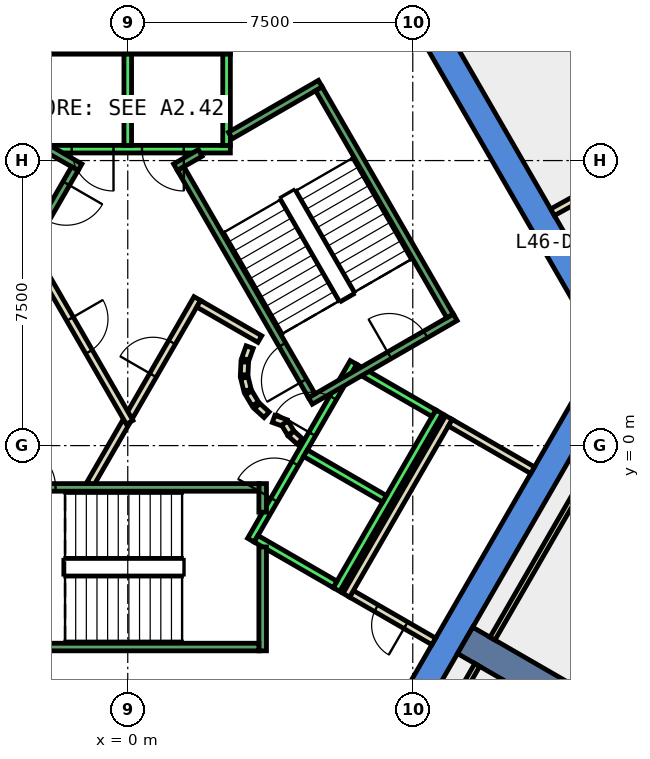
"""IFC4 building model, lengths in metres.
Left out: names, types, materials, properties, quantities, classifications, styles, units other than length and angle.
Written with IfcOpenShell. Run it as: python <this file> out.ifc"""

import sys

from ifc_helpers import new_model, si_unit, direction, frame, frame_2d, origin, place, context, subcontext, project, spatial, polyline, rectangle, outline, extrude, element, fill, save


model = new_model("IFC4")
c1 = context("Model", 3, precision=1e-05, world=origin(), true_north=direction((0.0, 1.0)))
c2 = subcontext(c1, "Body", "Model", "MODEL_VIEW")
j1 = project(units=[si_unit("LENGTHUNIT", "METRE"), si_unit("PLANEANGLEUNIT", "RADIAN")], contexts=[c1])
p1 = place(None, origin())
s1 = spatial("IfcSite", under=j1, at=p1, CompositionType="ELEMENT")
p2 = place(p1, origin())
s2 = spatial("IfcBuilding", under=s1, at=p2, CompositionType="ELEMENT")
p3 = place(p2, frame((0.0, 0.0, 206.6)))
s3 = spatial("IfcBuildingStorey", under=s2, at=p3, CompositionType="ELEMENT", Elevation=206.6)
p4 = place(p3, frame((0.0, 0.0, -0.4)))
e1 = element("IfcWall", 1, at=p4, inside=s3, PredefinedType="SHEAR", context=c2, shape_type="SweptSolid", body=[
    extrude(outline(polyline([(8.084, 11.498), (7.478, 11.148), (12.471, 2.5), (13.279, 2.5), (8.084, 11.498)])), origin(), (0.0, 0.0, 1.0), 4.2),
])
p5 = place(p3, frame((0.0, 0.0, -0.4)))
e2 = element("IfcWall", 2, at=p5, inside=s3, PredefinedType="SHEAR", context=c2, shape_type="SweptSolid", body=[
    extrude(outline(polyline([(6.64, -9.0), (13.279, 2.5), (12.471, 2.5), (6.235, -8.3), (6.64, -9.0)])), origin(), (0.0, 0.0, 1.0), 4.2),
])
p6 = place(p3, frame((8.877, -5.125, -0.4), z_axis=(0.0, 0.0, 1.0), x_axis=(0.866017533419, -0.500013631625, 0.0)))
e3 = element("IfcWall", 3, at=p6, inside=s3, PredefinedType="SHEAR", context=c2, shape_type="SweptSolid", body=[
    extrude(rectangle(XDim=9.0, YDim=0.8, at=frame_2d((4.5, 0.0))), origin(), (0.0, 0.0, 1.0), 4.2),
])
p7 = place(p3, frame((12.474, 6.856, 0.0), z_axis=(0.0, 0.0, 1.0), x_axis=(-0.875305814696, -0.483569778584, 0.0)))
e4 = element("IfcWall", 4, at=p7, inside=s3, PredefinedType="PARTITIONING", context=c2, shape_type="SweptSolid", body=[
    extrude(rectangle(XDim=1.481, YDim=0.2, at=frame_2d((0.74, 0.0))), origin(), (0.0, 0.0, 1.0), 3.8),
])
p8 = place(p3, frame((8.053, -5.152, 0.0), z_axis=(0.0, 0.0, 1.0), x_axis=(-0.866022959057, 0.500004234368, 0.0)))
e5 = element("IfcWall", 5, at=p8, inside=s3, PredefinedType="PARTITIONING", context=c2, shape_type="SweptSolid", body=[
    extrude(rectangle(XDim=2.5, YDim=0.2, at=frame_2d((1.25, 0.0))), origin(), (0.0, 0.0, 1.0), 3.8),
])
p9 = place(p8, frame((0.85, 0.0, 0.0)))
e6 = element("IfcOpeningElement", 6, at=p9, cuts=e5, PredefinedType="OPENING", context=c2, shape_type="SweptSolid", body=[
    extrude(rectangle(XDim=0.9, YDim=2.1, at=frame_2d((0.45, 1.05))), frame((0.0, 0.11, 0.0), z_axis=(0.0, -1.0, 0.0), x_axis=(1.0, 0.0, 0.0)), (0.0, 0.0, 1.0), 0.22),
])
p10 = place(p3, frame((5.751, -3.938, 0.0), z_axis=(0.0, 0.0, 1.0), x_axis=(0.500034260056, 0.866005622828, 0.0)))
e7 = element("IfcWall", 7, at=p10, inside=s3, PredefinedType="PARTITIONING", context=c2, shape_type="SweptSolid", body=[
    extrude(rectangle(XDim=5.399, YDim=0.2, at=frame_2d((2.7, 0.0))), origin(), (0.0, 0.0, 1.0), 3.8),
])
p11 = place(p3, frame((8.488, 0.602, 0.0), z_axis=(0.0, 0.0, 1.0), x_axis=(0.866022959057, -0.500004234368, 0.0)))
e8 = element("IfcWall", 8, at=p11, inside=s3, PredefinedType="PARTITIONING", context=c2, shape_type="SweptSolid", body=[
    extrude(rectangle(XDim=2.5, YDim=0.2, at=frame_2d((1.25, 0.0))), origin(), (0.0, 0.0, 1.0), 3.8),
])
p12 = place(p3, frame((7.283, -9.086, 0.0), z_axis=(0.0, 0.0, 1.0), x_axis=(0.500035303972, 0.866005020067, 0.0)))
e9 = element("IfcWall", 9, at=p12, inside=s3, PredefinedType="PARTITIONING", context=c2, shape_type="SweptSolid", body=[
    extrude(rectangle(XDim=3.828, YDim=0.15, at=frame_2d((1.914, 0.0))), origin(), (0.0, 0.0, 1.0), 3.8),
])
p13 = place(p3, frame((-0.982, -1.0, 0.0), z_axis=(0.0, 0.0, 1.0), x_axis=(0.50024047865, 0.865886518847, 0.0)))
e10 = element("IfcWall", 10, at=p13, inside=s3, PredefinedType="PARTITIONING", context=c2, shape_type="SweptSolid", body=[
    extrude(rectangle(XDim=1.863, YDim=0.2, at=frame_2d((0.931, 0.0))), origin(), (0.0, 0.0, 1.0), 3.8),
])
p14 = place(p3, frame((0.05, 0.787, 0.0), z_axis=(0.0, 0.0, 1.0), x_axis=(0.499954076797, 0.866051915934, 0.0)))
e11 = element("IfcWall", 11, at=p14, inside=s3, PredefinedType="PARTITIONING", context=c2, shape_type="SweptSolid", body=[
    extrude(rectangle(XDim=3.558, YDim=0.2, at=frame_2d((1.779, 0.0))), origin(), (0.0, 0.0, 1.0), 3.8),
])
p15 = place(p14, frame((1.229, 0.0, 0.0)))
e12 = element("IfcOpeningElement", 12, at=p15, cuts=e11, PredefinedType="OPENING", context=c2, shape_type="SweptSolid", body=[
    extrude(rectangle(XDim=1.0, YDim=2.1, at=frame_2d((0.5, 1.05))), frame((0.0, 0.11, 0.0), z_axis=(0.0, -1.0, 0.0), x_axis=(1.0, 0.0, 0.0)), (0.0, 0.0, 1.0), 0.22),
])
p16 = place(p3, frame((1.866, 3.732, 0.0), z_axis=(0.0, 0.0, 1.0), x_axis=(0.866043361281, -0.499968895414, 0.0)))
e13 = element("IfcWall", 13, at=p16, inside=s3, PredefinedType="PARTITIONING", context=c2, shape_type="SweptSolid", body=[
    extrude(rectangle(XDim=1.858, YDim=0.2, at=frame_2d((0.929, 0.0))), origin(), (0.0, 0.0, 1.0), 3.8),
])
p17 = place(p3, frame((3.208, 2.592, 0.0), z_axis=(0.0, 0.0, 1.0), x_axis=(-0.337388820924, -0.941365382578, 0.0)))
e14 = element("IfcWall", 14, at=p17, inside=s3, PredefinedType="PARTITIONING", context=c2, shape_type="SweptSolid", body=[
    extrude(rectangle(XDim=0.338, YDim=0.2, at=frame_2d((0.169, 0.0))), origin(), (0.0, 0.0, 1.0), 3.8),
])
p18 = place(p3, frame((3.079, 2.199, 0.0), z_axis=(0.0, 0.0, 1.0), x_axis=(-0.047771483479, -0.998858290933, 0.0)))
e15 = element("IfcWall", 15, at=p18, inside=s3, PredefinedType="PARTITIONING", context=c2, shape_type="SweptSolid", body=[
    extrude(rectangle(XDim=0.337, YDim=0.2, at=frame_2d((0.169, 0.0))), origin(), (0.0, 0.0, 1.0), 3.8),
])
p19 = place(p3, frame((3.07, 1.786, 0.0), z_axis=(0.0, 0.0, 1.0), x_axis=(0.242705583207, -0.970099994784, 0.0)))
e16 = element("IfcWall", 16, at=p19, inside=s3, PredefinedType="PARTITIONING", context=c2, shape_type="SweptSolid", body=[
    extrude(rectangle(XDim=0.338, YDim=0.2, at=frame_2d((0.169, 0.0))), origin(), (0.0, 0.0, 1.0), 3.8),
])
for number, where, z_axis, x_axis in (
    (17, (3.182, 1.388, 0.0), (0.0, 0.0, 1.0), (0.512, -0.859, 0.0)),
    (18, (3.404, 1.039, 0.0), (0.0, 0.0, 1.0), (0.74, -0.672, 0.0)),
):
    element("IfcWall", number, at=place(p3, frame(where, z_axis=z_axis, x_axis=x_axis)), inside=s3, PredefinedType="PARTITIONING", context=c2, shape_type="SweptSolid", body=[
        extrude(rectangle(XDim=0.338, YDim=0.2, at=frame_2d((0.169, 0.0))), origin(), (0.0, 0.0, 1.0), 3.8),
    ])
p20 = place(p3, frame((3.838, 0.702, 0.0), z_axis=(0.0, 0.0, 1.0), x_axis=(0.941035081519, -0.338308993895, 0.0)))
e19 = element("IfcWall", 19, at=p20, inside=s3, PredefinedType="PARTITIONING", context=c2, shape_type="SweptSolid", body=[
    extrude(rectangle(XDim=0.337, YDim=0.2, at=frame_2d((0.168, 0.0))), origin(), (0.0, 0.0, 1.0), 3.8),
])
p21 = place(p3, frame((4.132, 0.593, 0.0), z_axis=(0.0, 0.0, 1.0), x_axis=(0.513561617048, -0.858052717201, 0.0)))
e20 = element("IfcWall", 20, at=p21, inside=s3, PredefinedType="PARTITIONING", context=c2, shape_type="SweptSolid", body=[
    extrude(rectangle(XDim=0.308, YDim=0.2, at=frame_2d((0.154, 0.0))), origin(), (0.0, 0.0, 1.0), 3.8),
])
p22 = place(p3, frame((4.301, 0.315, 0.0), z_axis=(0.0, 0.0, 1.0), x_axis=(0.741798017506, -0.670623367639, 0.0)))
e21 = element("IfcWall", 21, at=p22, inside=s3, PredefinedType="PARTITIONING", context=c2, shape_type="SweptSolid", body=[
    extrude(rectangle(XDim=0.309, YDim=0.2, at=frame_2d((0.154, 0.0))), origin(), (0.0, 0.0, 1.0), 3.8),
])
p23 = place(p3, frame((-2.54, 5.1, 0.0), z_axis=(0.0, 0.0, 1.0), x_axis=(0.499925051871, -0.866068670783, 0.0)))
e22 = element("IfcWall", 22, at=p23, inside=s3, PredefinedType="PARTITIONING", context=c2, shape_type="SweptSolid", body=[
    extrude(rectangle(XDim=5.181, YDim=0.2, at=frame_2d((2.59, 0.0))), origin(), (0.0, 0.0, 1.0), 3.8),
])
p24 = place(p23, frame((2.04, 0.0, 0.0)))
e23 = element("IfcOpeningElement", 23, at=p24, cuts=e22, PredefinedType="OPENING", context=c2, shape_type="SweptSolid", body=[
    extrude(rectangle(XDim=1.0, YDim=2.1, at=frame_2d((0.5, 1.05))), frame((0.0, 0.11, 0.0), z_axis=(0.0, -1.0, 0.0), x_axis=(1.0, 0.0, 0.0)), (0.0, 0.0, 1.0), 0.22),
])
p25 = place(p3, frame((9.597, -5.079, 0.0), z_axis=(0.0, 0.0, 1.0), x_axis=(0.499962477963, 0.866047066059, 0.0)))
e24 = element("IfcWall", 24, at=p25, inside=s3, PredefinedType="PARTITIONING", context=c2, shape_type="SweptSolid", body=[
    extrude(rectangle(XDim=9.979, YDim=0.15, at=frame_2d((4.989, 0.0))), origin(), (0.0, 0.0, 1.0), 3.8),
])
p26 = place(p3, frame((2.7, 7.8, 0.0), z_axis=(0.0, 0.0, 1.0), x_axis=(-1.0, 0.0, 0.0)))
e25 = element("IfcWall", 25, at=p26, inside=s3, PredefinedType="STANDARD", context=c2, shape_type="SweptSolid", body=[
    extrude(rectangle(XDim=5.4, YDim=0.2, at=frame_2d((2.7, 0.0))), origin(), (0.0, 0.0, 1.0), 3.8),
])
p27 = place(p26, frame((1.225, 0.0, 0.0)))
e26 = element("IfcOpeningElement", 26, at=p27, cuts=e25, PredefinedType="OPENING", context=c2, shape_type="SweptSolid", body=[
    extrude(rectangle(XDim=1.1, YDim=2.1, at=frame_2d((0.55, 1.05))), frame((0.0, 0.11, 0.0), z_axis=(0.0, -1.0, 0.0), x_axis=(1.0, 0.0, 0.0)), (0.0, 0.0, 1.0), 0.22),
])
p28 = place(p26, frame((3.075, 0.0, 0.0)))
e27 = element("IfcOpeningElement", 27, at=p28, cuts=e25, PredefinedType="OPENING", context=c2, shape_type="SweptSolid", body=[
    extrude(rectangle(XDim=1.1, YDim=2.1, at=frame_2d((0.55, 1.05))), frame((0.0, 0.11, 0.0), z_axis=(0.0, -1.0, 0.0), x_axis=(1.0, 0.0, 0.0)), (0.0, 0.0, 1.0), 0.22),
])
p29 = place(p3, frame((2.7, 10.4, 0.0), z_axis=(0.0, 0.0, 1.0), x_axis=(-1.0, 0.0, 0.0)))
e28 = element("IfcWall", 28, at=p29, inside=s3, PredefinedType="STANDARD", context=c2, shape_type="SweptSolid", body=[
    extrude(rectangle(XDim=5.4, YDim=0.2, at=frame_2d((2.7, 0.0))), origin(), (0.0, 0.0, 1.0), 3.8),
])
for number, where, z_axis, x_axis in (
    (29, (2.6, 7.9, 0.0), (0.0, 0.0, 1.0), (0.0, 1.0, 0.0)),
    (30, (0.0, 7.9, 0.0), (0.0, 0.0, 1.0), (0.0, 1.0, 0.0)),
):
    element("IfcWall", number, at=place(p3, frame(where, z_axis=z_axis, x_axis=x_axis)), inside=s3, PredefinedType="STANDARD", context=c2, shape_type="SweptSolid", body=[
        extrude(rectangle(XDim=2.4, YDim=0.2, at=frame_2d((1.2, 0.0))), origin(), (0.0, 0.0, 1.0), 3.8),
    ])
p30 = place(p3, frame((3.24, -2.488, 0.0), z_axis=(0.0, 0.0, 1.0), x_axis=(0.500034260056, 0.866005622828, 0.0)))
e31 = element("IfcWall", 31, at=p30, inside=s3, PredefinedType="STANDARD", context=c2, shape_type="SweptSolid", body=[
    extrude(rectangle(XDim=5.399, YDim=0.2, at=frame_2d((2.7, 0.0))), origin(), (0.0, 0.0, 1.0), 3.8),
])
p31 = place(p30, frame((3.225, 0.0, 0.0)))
e32 = element("IfcOpeningElement", 32, at=p31, cuts=e31, PredefinedType="OPENING", context=c2, shape_type="SweptSolid", body=[
    extrude(rectangle(XDim=1.1, YDim=2.1, at=frame_2d((0.55, 1.05))), frame((0.0, 0.11, 0.0), z_axis=(0.0, -1.0, 0.0), x_axis=(1.0, 0.0, 0.0)), (0.0, 0.0, 1.0), 0.22),
])
p32 = place(p30, frame((1.225, 0.0, 0.0)))
e33 = element("IfcOpeningElement", 33, at=p32, cuts=e31, PredefinedType="OPENING", context=c2, shape_type="SweptSolid", body=[
    extrude(rectangle(XDim=1.1, YDim=2.1, at=frame_2d((0.55, 1.05))), frame((0.0, 0.11, 0.0), z_axis=(0.0, -1.0, 0.0), x_axis=(1.0, 0.0, 0.0)), (0.0, 0.0, 1.0), 0.22),
])
p33 = place(p3, frame((5.492, -3.788, 0.0), z_axis=(0.0, 0.0, 1.0), x_axis=(0.500034260056, 0.866005622828, 0.0)))
e34 = element("IfcWall", 34, at=p33, inside=s3, PredefinedType="STANDARD", context=c2, shape_type="SweptSolid", body=[
    extrude(rectangle(XDim=5.399, YDim=0.2, at=frame_2d((2.7, 0.0))), origin(), (0.0, 0.0, 1.0), 3.8),
])
p34 = place(p3, frame((3.377, -2.452, 0.0), z_axis=(0.0, 0.0, 1.0), x_axis=(0.865955154139, -0.50012165622, 0.0)))
e35 = element("IfcWall", 35, at=p34, inside=s3, PredefinedType="STANDARD", context=c2, shape_type="SweptSolid", body=[
    extrude(rectangle(XDim=2.4, YDim=0.2, at=frame_2d((1.2, 0.0))), origin(), (0.0, 0.0, 1.0), 3.8),
])
for number, where, z_axis, x_axis in (
    (36, (4.677, -0.2, 0.0), (0.0, 0.0, 1.0), (0.866, -0.5, 0.0)),
    (37, (5.977, 2.052, 0.0), (0.0, 0.0, 1.0), (0.866, -0.5, 0.0)),
):
    element("IfcWall", number, at=place(p3, frame(where, z_axis=z_axis, x_axis=x_axis)), inside=s3, PredefinedType="STANDARD", context=c2, shape_type="SweptSolid", body=[
        extrude(rectangle(XDim=2.399, YDim=0.2, at=frame_2d((1.2, 0.0))), origin(), (0.0, 0.0, 1.0), 3.8),
    ])
p35 = place(p3, frame((3.55, -2.667, 0.0), z_axis=(0.0, 0.0, 1.0), x_axis=(0.0, -1.0, 0.0)))
e38 = element("IfcWall", 38, at=p35, inside=s3, PredefinedType="STANDARD", context=c2, shape_type="SweptSolid", body=[
    extrude(rectangle(XDim=2.733, YDim=0.2, at=frame_2d((1.366, 0.0))), origin(), (0.0, 0.0, 1.0), 3.8),
])
p36 = place(p3, frame((3.55, -1.0, 0.0), z_axis=(0.0, 0.0, 1.0), x_axis=(0.0, -1.0, 0.0)))
e39 = element("IfcWall", 39, at=p36, inside=s3, PredefinedType="STANDARD", context=c2, shape_type="SweptSolid", body=[
    extrude(rectangle(XDim=0.751, YDim=0.2, at=frame_2d((0.375, 0.0))), origin(), (0.0, 0.0, 1.0), 3.8),
])
p37 = place(p3, frame((-3.45, -1.1, 0.0), z_axis=(0.0, 0.0, 1.0), x_axis=(1.0, 0.0, 0.0)))
e40 = element("IfcWall", 40, at=p37, inside=s3, PredefinedType="STANDARD", context=c2, shape_type="SweptSolid", body=[
    extrude(rectangle(XDim=6.9, YDim=0.2, at=frame_2d((3.45, 0.0))), origin(), (0.0, 0.0, 1.0), 3.8),
])
p38 = place(p37, frame((0.45, 0.0, 0.0)))
e41 = element("IfcOpeningElement", 41, at=p38, cuts=e40, PredefinedType="OPENING", context=c2, shape_type="SweptSolid", body=[
    extrude(rectangle(XDim=1.1, YDim=2.2, at=frame_2d((0.55, 1.1))), frame((0.0, 0.11, 0.0), z_axis=(0.0, -1.0, 0.0), x_axis=(1.0, 0.0, 0.0)), (0.0, 0.0, 1.0), 0.22),
])
p39 = place(p3, frame((-3.45, -5.3, 0.0), z_axis=(0.0, 0.0, 1.0), x_axis=(1.0, 0.0, 0.0)))
e42 = element("IfcWall", 42, at=p39, inside=s3, PredefinedType="STANDARD", context=c2, shape_type="SweptSolid", body=[
    extrude(rectangle(XDim=6.9, YDim=0.2, at=frame_2d((3.45, 0.0))), origin(), (0.0, 0.0, 1.0), 3.8),
])
p40 = place(p3, frame((4.806, 1.176, 0.0), z_axis=(0.0, 0.0, 1.0), x_axis=(0.866059941101, 0.499940174841, 0.0)))
e43 = element("IfcWall", 43, at=p40, inside=s3, PredefinedType="STANDARD", context=c2, shape_type="SweptSolid", body=[
    extrude(rectangle(XDim=4.4, YDim=0.2, at=frame_2d((2.2, 0.0))), origin(), (0.0, 0.0, 1.0), 3.8),
])
p41 = place(p40, frame((2.4, 0.0, 0.0)))
e44 = element("IfcOpeningElement", 44, at=p41, cuts=e43, PredefinedType="OPENING", context=c2, shape_type="SweptSolid", body=[
    extrude(rectangle(XDim=1.1, YDim=2.2, at=frame_2d((0.55, 1.1))), frame((0.0, 0.11, 0.0), z_axis=(0.0, -1.0, 0.0), x_axis=(1.0, 0.0, 0.0)), (0.0, 0.0, 1.0), 0.22),
])
p42 = place(p3, frame((2.7, 8.158, 0.0), z_axis=(0.0, 0.0, 1.0), x_axis=(0.86611865017, 0.499838457731, 0.0)))
e45 = element("IfcWall", 45, at=p42, inside=s3, PredefinedType="STANDARD", context=c2, shape_type="SweptSolid", body=[
    extrude(rectangle(XDim=2.733, YDim=0.2, at=frame_2d((1.366, 0.0))), origin(), (0.0, 0.0, 1.0), 3.8),
])
p43 = place(p3, frame((1.256, 7.324, 0.0), z_axis=(0.0, 0.0, 1.0), x_axis=(0.865915093549, 0.500191014278, 0.0)))
e46 = element("IfcWall", 46, at=p43, inside=s3, PredefinedType="STANDARD", context=c2, shape_type="SweptSolid", body=[
    extrude(rectangle(XDim=0.752, YDim=0.2, at=frame_2d((0.376, 0.0))), origin(), (0.0, 0.0, 1.0), 3.8),
])
p44 = place(p3, frame((4.843, 1.312, 0.0), z_axis=(0.0, 0.0, 1.0), x_axis=(-0.499963383562, 0.866046543262, 0.0)))
e47 = element("IfcWall", 47, at=p44, inside=s3, PredefinedType="STANDARD", context=c2, shape_type="SweptSolid", body=[
    extrude(rectangle(XDim=6.9, YDim=0.2, at=frame_2d((3.45, 0.0))), origin(), (0.0, 0.0, 1.0), 3.8),
])
p45 = place(p44, frame((0.45, 0.0, 0.0)))
e48 = element("IfcOpeningElement", 48, at=p45, cuts=e47, PredefinedType="OPENING", context=c2, shape_type="SweptSolid", body=[
    extrude(rectangle(XDim=1.1, YDim=2.2, at=frame_2d((0.55, 1.1))), frame((0.0, 0.11, 0.0), z_axis=(0.0, -1.0, 0.0), x_axis=(1.0, 0.0, 0.0)), (0.0, 0.0, 1.0), 0.22),
])
p46 = place(p3, frame((8.48, 3.412, 0.0), z_axis=(0.0, 0.0, 1.0), x_axis=(-0.499978703459, 0.866037698999, 0.0)))
e49 = element("IfcWall", 49, at=p46, inside=s3, PredefinedType="STANDARD", context=c2, shape_type="SweptSolid", body=[
    extrude(rectangle(XDim=6.9, YDim=0.2, at=frame_2d((3.45, 0.0))), origin(), (0.0, 0.0, 1.0), 3.8),
])
p47 = place(p3, frame((-1.256, 7.324, 0.0), z_axis=(0.0, 0.0, 1.0), x_axis=(-0.866046073146, 0.499964197906, 0.0)))
e50 = element("IfcWall", 50, at=p47, inside=s3, PredefinedType="STANDARD", context=c2, shape_type="SweptSolid", body=[
    extrude(rectangle(XDim=4.4, YDim=0.2, at=frame_2d((2.2, 0.0))), origin(), (0.0, 0.0, 1.0), 3.8),
])
p48 = place(p47, frame((2.4, 0.0, 0.0)))
e51 = element("IfcOpeningElement", 51, at=p48, cuts=e50, PredefinedType="OPENING", context=c2, shape_type="SweptSolid", body=[
    extrude(rectangle(XDim=1.1, YDim=2.2, at=frame_2d((0.55, 1.1))), frame((0.0, 0.11, 0.0), z_axis=(0.0, -1.0, 0.0), x_axis=(1.0, 0.0, 0.0)), (0.0, 0.0, 1.0), 0.22),
])
p49 = place(p3, frame((-1.393, 7.288, 0.0), z_axis=(0.0, 0.0, 1.0), x_axis=(-0.499963383562, -0.866046543262, 0.0)))
e52 = element("IfcWall", 52, at=p49, inside=s3, PredefinedType="STANDARD", context=c2, shape_type="SweptSolid", body=[
    extrude(rectangle(XDim=6.9, YDim=0.2, at=frame_2d((3.45, 0.0))), origin(), (0.0, 0.0, 1.0), 3.8),
])
p50 = place(p49, frame((0.45, 0.0, 0.0)))
e53 = element("IfcOpeningElement", 53, at=p50, cuts=e52, PredefinedType="OPENING", context=c2, shape_type="SweptSolid", body=[
    extrude(rectangle(XDim=1.1, YDim=2.2, at=frame_2d((0.55, 1.1))), frame((0.0, 0.11, 0.0), z_axis=(0.0, -1.0, 0.0), x_axis=(1.0, 0.0, 0.0)), (0.0, 0.0, 1.0), 0.22),
])
p51 = place(p15, origin())
e54 = element("IfcDoor", 54, at=p51, inside=s3, OperationType="SINGLE_SWING_RIGHT", PredefinedType="DOOR", context=c2, shape_type="SweptSolid", body=[
    extrude(rectangle(XDim=1.0, YDim=2.1, at=frame_2d((0.5, 1.05))), frame((0.0, 0.025, 0.0), z_axis=(0.0, -1.0, 0.0), x_axis=(1.0, 0.0, 0.0)), (0.0, 0.0, 1.0), 0.05),
])
fill(e12, e54)
p52 = place(p24, origin())
e55 = element("IfcDoor", 55, at=p52, inside=s3, OperationType="SINGLE_SWING_RIGHT", PredefinedType="DOOR", context=c2, shape_type="SweptSolid", body=[
    extrude(rectangle(XDim=1.0, YDim=2.1, at=frame_2d((0.5, 1.05))), frame((0.0, 0.025, 0.0), z_axis=(0.0, -1.0, 0.0), x_axis=(1.0, 0.0, 0.0)), (0.0, 0.0, 1.0), 0.05),
])
fill(e23, e55)
p53 = place(p9, origin())
e56 = element("IfcDoor", 56, at=p53, inside=s3, OperationType="SINGLE_SWING_LEFT", PredefinedType="DOOR", context=c2, shape_type="SweptSolid", body=[
    extrude(rectangle(XDim=0.9, YDim=2.1, at=frame_2d((0.45, 1.05))), frame((0.0, 0.025, 0.0), z_axis=(0.0, -1.0, 0.0), x_axis=(1.0, 0.0, 0.0)), (0.0, 0.0, 1.0), 0.05),
])
fill(e6, e56)
p54 = place(p27, origin())
e57 = element("IfcDoor", 57, at=p54, inside=s3, OperationType="SLIDING_TO_LEFT", PredefinedType="DOOR", context=c2, shape_type="SweptSolid", body=[
    extrude(rectangle(XDim=1.1, YDim=2.1, at=frame_2d((0.55, 1.05))), frame((0.0, 0.025, 0.0), z_axis=(0.0, -1.0, 0.0), x_axis=(1.0, 0.0, 0.0)), (0.0, 0.0, 1.0), 0.05),
])
fill(e26, e57)
p55 = place(p28, origin())
e58 = element("IfcDoor", 58, at=p55, inside=s3, OperationType="SLIDING_TO_LEFT", PredefinedType="DOOR", context=c2, shape_type="SweptSolid", body=[
    extrude(rectangle(XDim=1.1, YDim=2.1, at=frame_2d((0.55, 1.05))), frame((0.0, 0.025, 0.0), z_axis=(0.0, -1.0, 0.0), x_axis=(1.0, 0.0, 0.0)), (0.0, 0.0, 1.0), 0.05),
])
fill(e27, e58)
p56 = place(p31, origin())
e59 = element("IfcDoor", 59, at=p56, inside=s3, OperationType="SLIDING_TO_LEFT", PredefinedType="DOOR", context=c2, shape_type="SweptSolid", body=[
    extrude(rectangle(XDim=1.1, YDim=2.1, at=frame_2d((0.55, 1.05))), frame((0.0, 0.025, 0.0), z_axis=(0.0, -1.0, 0.0), x_axis=(1.0, 0.0, 0.0)), (0.0, 0.0, 1.0), 0.05),
])
fill(e32, e59)
p57 = place(p32, origin())
e60 = element("IfcDoor", 60, at=p57, inside=s3, OperationType="SLIDING_TO_LEFT", PredefinedType="DOOR", context=c2, shape_type="SweptSolid", body=[
    extrude(rectangle(XDim=1.1, YDim=2.1, at=frame_2d((0.55, 1.05))), frame((0.0, 0.025, 0.0), z_axis=(0.0, -1.0, 0.0), x_axis=(1.0, 0.0, 0.0)), (0.0, 0.0, 1.0), 0.05),
])
fill(e33, e60)
p58 = place(p38, origin())
e61 = element("IfcDoor", 61, at=p58, inside=s3, OperationType="SINGLE_SWING_LEFT", PredefinedType="DOOR", context=c2, shape_type="SweptSolid", body=[
    extrude(rectangle(XDim=1.1, YDim=2.2, at=frame_2d((0.55, 1.1))), frame((0.0, 0.025, 0.0), z_axis=(0.0, -1.0, 0.0), x_axis=(1.0, 0.0, 0.0)), (0.0, 0.0, 1.0), 0.05),
])
fill(e41, e61)
p59 = place(p45, origin())
e62 = element("IfcDoor", 62, at=p59, inside=s3, OperationType="SINGLE_SWING_LEFT", PredefinedType="DOOR", context=c2, shape_type="SweptSolid", body=[
    extrude(rectangle(XDim=1.1, YDim=2.2, at=frame_2d((0.55, 1.1))), frame((0.0, 0.025, 0.0), z_axis=(0.0, -1.0, 0.0), x_axis=(1.0, 0.0, 0.0)), (0.0, 0.0, 1.0), 0.05),
])
fill(e48, e62)
p60 = place(p41, origin())
e63 = element("IfcDoor", 63, at=p60, inside=s3, OperationType="SINGLE_SWING_LEFT", PredefinedType="DOOR", context=c2, shape_type="SweptSolid", body=[
    extrude(rectangle(XDim=1.1, YDim=2.2, at=frame_2d((0.55, 1.1))), frame((0.0, 0.025, 0.0), z_axis=(0.0, -1.0, 0.0), x_axis=(1.0, 0.0, 0.0)), (0.0, 0.0, 1.0), 0.05),
])
fill(e44, e63)
p61 = place(p50, origin())
e64 = element("IfcDoor", 64, at=p61, inside=s3, OperationType="SINGLE_SWING_LEFT", PredefinedType="DOOR", context=c2, shape_type="SweptSolid", body=[
    extrude(rectangle(XDim=1.1, YDim=2.2, at=frame_2d((0.55, 1.1))), frame((0.0, 0.025, 0.0), z_axis=(0.0, -1.0, 0.0), x_axis=(1.0, 0.0, 0.0)), (0.0, 0.0, 1.0), 0.05),
])
fill(e53, e64)
save(model, sys.argv[1])
